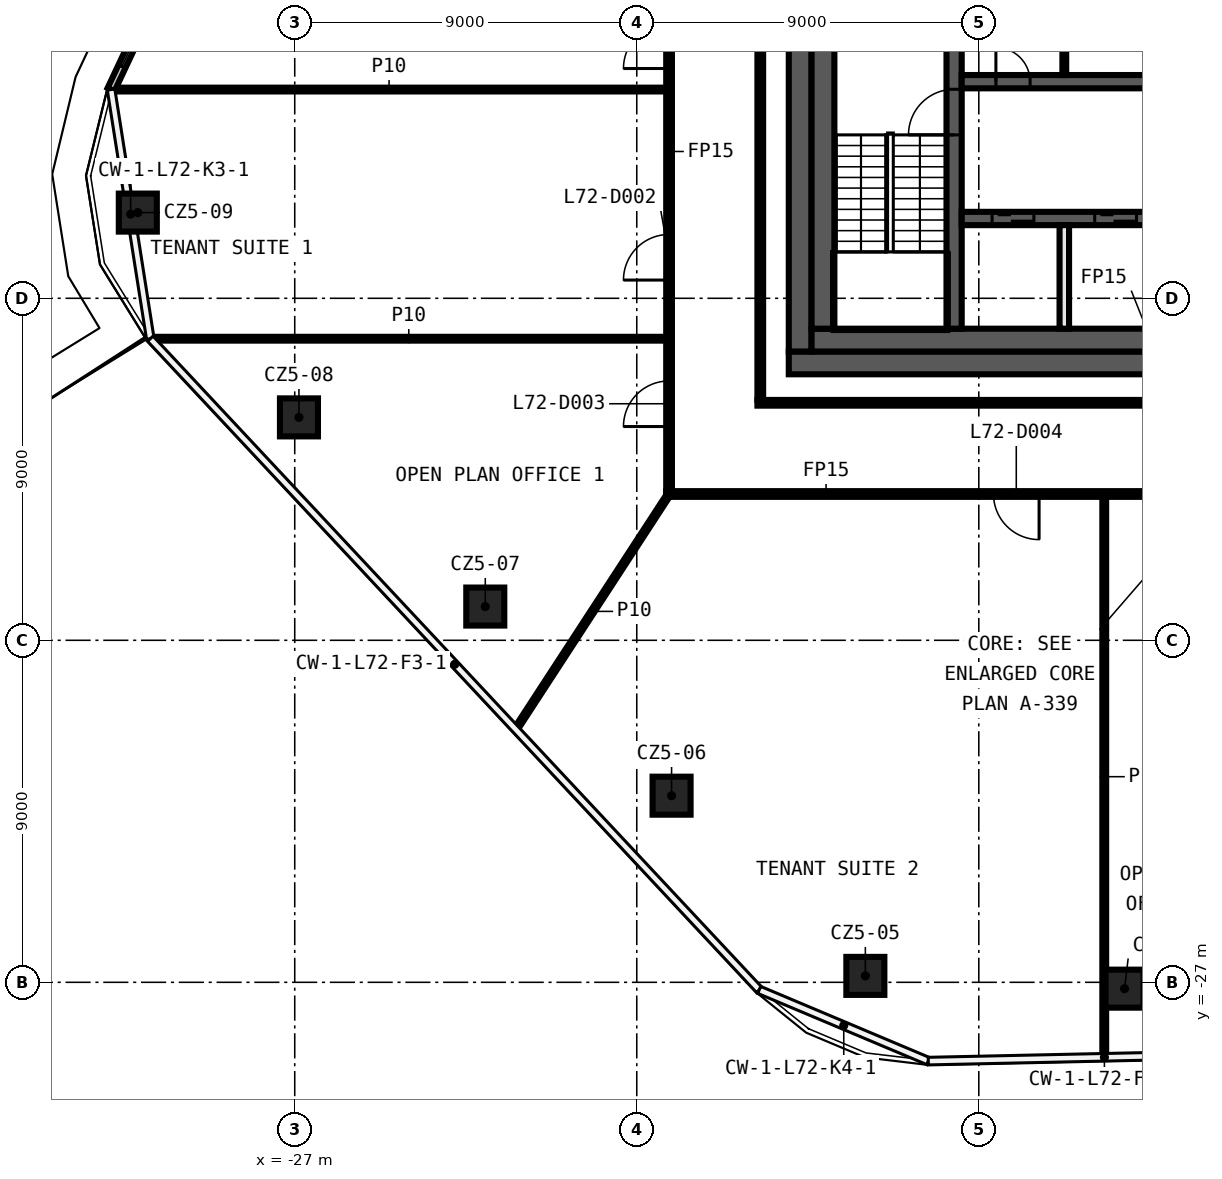
"""IFC4 building model, lengths in metres.
Left out: names, types, materials, properties, quantities, classifications, styles, units other than length and angle.
Written with IfcOpenShell. Run it as: python <this file> out.ifc"""

import sys

from ifc_helpers import new_model, si_unit, direction, frame, frame_2d, origin, origin_2d, place, context, subcontext, project, spatial, rectangle, extrude, element, fill, save


model = new_model("IFC4")
c1 = context("Model", 3, precision=1e-05, world=origin(), true_north=direction((0.0, 1.0)))
c2 = subcontext(c1, "Body", "Model", "MODEL_VIEW")
j1 = project(units=[si_unit("LENGTHUNIT", "METRE"), si_unit("PLANEANGLEUNIT", "RADIAN")], contexts=[c1])
p1 = place(None, origin())
s1 = spatial("IfcSite", under=j1, at=p1, CompositionType="ELEMENT")
p2 = place(p1, origin())
s2 = spatial("IfcBuilding", under=s1, at=p2, CompositionType="ELEMENT")
p3 = place(p2, frame((0.0, 0.0, 336.2)))
s3 = spatial("IfcBuildingStorey", under=s2, at=p3, CompositionType="ELEMENT", Elevation=336.2)
for number, where, z_axis, x_axis in (
    (1, (-5.166, -27.167, 0.0), (0.0, 0.0, 1.0), (1.0, 0.0, 0.0)),
    (2, (-11.985, -26.831, 0.0), (0.0, 0.0, 1.0), (1.0, 0.0, 0.0)),
    (3, (-17.084, -22.089, 0.0), (0.0, 0.0, 1.0), (1.0, 0.0, 0.0)),
    (4, (-21.986, -17.112, 0.0), (0.0, 0.0, 1.0), (1.0, 0.0, 0.0)),
    (5, (-26.889, -12.134, 0.0), (0.0, 0.0, 1.0), (1.0, 0.0, 0.0)),
    (6, (-31.129, -6.745, 0.0), (0.0, 0.0, 1.0), (1.0, 0.0, 0.0)),
):
    element("IfcColumn", number, at=place(p3, frame(where, z_axis=z_axis, x_axis=x_axis)), inside=s3, PredefinedType="COLUMN", context=c2, shape_type="SweptSolid", body=[
        extrude(rectangle(XDim=1.0, YDim=1.0, at=origin_2d()), origin(), (0.0, 0.0, 1.0), 3.82),
    ])
p4 = place(p3, frame((17.225, -14.15, 0.0), z_axis=(0.0, 0.0, 1.0), x_axis=(-1.0, 0.0, 0.0)))
e7 = element("IfcWall", 7, at=p4, inside=s3, PredefinedType="PARTITIONING", context=c2, shape_type="SweptSolid", body=[
    extrude(rectangle(XDim=34.45, YDim=0.15, at=frame_2d((17.225, 0.0))), origin(), (0.0, 0.0, 1.0), 3.82),
])
p5 = place(p4, frame((24.639, 0.0, 0.0)))
e8 = element("IfcOpeningElement", 8, at=p5, cuts=e7, PredefinedType="OPENING", context=c2, shape_type="SweptSolid", body=[
    extrude(rectangle(XDim=1.2, YDim=2.1, at=frame_2d((0.6, 1.05))), frame((0.0, 0.085, 0.0), z_axis=(0.0, -1.0, 0.0), x_axis=(1.0, 0.0, 0.0)), (0.0, 0.0, 1.0), 0.17),
])
p6 = place(p4, frame((20.005, 0.0, 0.0)))
e9 = element("IfcOpeningElement", 9, at=p6, cuts=e7, PredefinedType="OPENING", context=c2, shape_type="SweptSolid", body=[
    extrude(rectangle(XDim=1.2, YDim=2.1, at=frame_2d((0.6, 1.05))), frame((0.0, 0.085, 0.0), z_axis=(0.0, -1.0, 0.0), x_axis=(1.0, 0.0, 0.0)), (0.0, 0.0, 1.0), 0.17),
])
p7 = place(p4, frame((15.367, 0.0, 0.0)))
e10 = element("IfcOpeningElement", 10, at=p7, cuts=e7, PredefinedType="OPENING", context=c2, shape_type="SweptSolid", body=[
    extrude(rectangle(XDim=1.2, YDim=2.1, at=frame_2d((0.6, 1.05))), frame((0.0, 0.085, 0.0), z_axis=(0.0, -1.0, 0.0), x_axis=(1.0, 0.0, 0.0)), (0.0, 0.0, 1.0), 0.17),
])
p8 = place(p4, frame((10.73, 0.0, 0.0)))
e11 = element("IfcOpeningElement", 11, at=p8, cuts=e7, PredefinedType="OPENING", context=c2, shape_type="SweptSolid", body=[
    extrude(rectangle(XDim=1.2, YDim=2.1, at=frame_2d((0.6, 1.05))), frame((0.0, 0.085, 0.0), z_axis=(0.0, -1.0, 0.0), x_axis=(1.0, 0.0, 0.0)), (0.0, 0.0, 1.0), 0.17),
])
p9 = place(p4, frame((6.097, 0.0, 0.0)))
e12 = element("IfcOpeningElement", 12, at=p9, cuts=e7, PredefinedType="OPENING", context=c2, shape_type="SweptSolid", body=[
    extrude(rectangle(XDim=1.2, YDim=2.1, at=frame_2d((0.6, 1.05))), frame((0.0, 0.085, 0.0), z_axis=(0.0, -1.0, 0.0), x_axis=(1.0, 0.0, 0.0)), (0.0, 0.0, 1.0), 0.17),
])
p10 = place(p4, frame((1.83, 0.0, 0.0)))
e13 = element("IfcOpeningElement", 13, at=p10, cuts=e7, PredefinedType="OPENING", context=c2, shape_type="SweptSolid", body=[
    extrude(rectangle(XDim=1.2, YDim=2.1, at=frame_2d((0.6, 1.05))), frame((0.0, 0.085, 0.0), z_axis=(0.0, -1.0, 0.0), x_axis=(1.0, 0.0, 0.0)), (0.0, 0.0, 1.0), 0.17),
])
p11 = place(p3, frame((-14.825, -11.75, 0.0), z_axis=(0.0, 0.0, 1.0), x_axis=(1.0, 0.0, 0.0)))
e14 = element("IfcWall", 14, at=p11, inside=s3, PredefinedType="PARTITIONING", context=c2, shape_type="SweptSolid", body=[
    extrude(rectangle(XDim=22.025, YDim=0.15, at=frame_2d((11.012, 0.0))), origin(), (0.0, 0.0, 1.0), 3.82),
])
p12 = place(p3, frame((-30.773, -10.064, 0.0), z_axis=(0.0, 0.0, 1.0), x_axis=(1.0, 0.0, 0.0)))
e15 = element("IfcWall", 15, at=p12, inside=s3, PredefinedType="PARTITIONING", context=c2, shape_type="SweptSolid", body=[
    extrude(rectangle(XDim=13.548, YDim=0.1, at=frame_2d((6.774, 0.0))), origin(), (0.0, 0.0, 1.0), 3.82),
])
p13 = place(p3, frame((-31.811, -3.507, 0.0), z_axis=(0.0, 0.0, 1.0), x_axis=(1.0, 0.0, 0.0)))
e16 = element("IfcWall", 16, at=p13, inside=s3, PredefinedType="PARTITIONING", context=c2, shape_type="SweptSolid", body=[
    extrude(rectangle(XDim=14.586, YDim=0.1, at=frame_2d((7.293, 0.0))), origin(), (0.0, 0.0, 1.0), 3.82),
])
p14 = place(p3, frame((-21.176, -20.328, 0.0), z_axis=(0.0, 0.0, 1.0), x_axis=(0.5459597113, 0.837811430834, 0.0)))
e17 = element("IfcWall", 17, at=p14, inside=s3, PredefinedType="PARTITIONING", context=c2, shape_type="SweptSolid", body=[
    extrude(rectangle(XDim=7.374, YDim=0.1, at=frame_2d((3.687, 0.0))), origin(), (0.0, 0.0, 1.0), 3.82),
])
p15 = place(p3, frame((-5.699, -28.953, 0.0), z_axis=(0.0, 0.0, 1.0), x_axis=(0.0, 1.0, 0.0)))
e18 = element("IfcWall", 18, at=p15, inside=s3, PredefinedType="PARTITIONING", context=c2, shape_type="SweptSolid", body=[
    extrude(rectangle(XDim=14.728, YDim=0.1, at=frame_2d((7.364, 0.0))), origin(), (0.0, 0.0, 1.0), 3.82),
])
p16 = place(p3, frame((-14.75, -11.675, 0.0), z_axis=(0.0, 0.0, 1.0), x_axis=(0.0, 1.0, 0.0)))
e19 = element("IfcWall", 19, at=p16, inside=s3, PredefinedType="PARTITIONING", context=c2, shape_type="SweptSolid", body=[
    extrude(rectangle(XDim=23.35, YDim=0.15, at=frame_2d((11.675, 0.0))), origin(), (0.0, 0.0, 1.0), 3.82),
])
p17 = place(p3, frame((-17.15, -14.075, 0.0), z_axis=(0.0, 0.0, 1.0), x_axis=(0.0, 1.0, 0.0)))
e20 = element("IfcWall", 20, at=p17, inside=s3, PredefinedType="PARTITIONING", context=c2, shape_type="SweptSolid", body=[
    extrude(rectangle(XDim=28.15, YDim=0.15, at=frame_2d((14.075, 0.0))), origin(), (0.0, 0.0, 1.0), 3.82),
])
p18 = place(p17, frame((11.122, 0.0, 0.0)))
e21 = element("IfcOpeningElement", 21, at=p18, cuts=e20, PredefinedType="OPENING", context=c2, shape_type="SweptSolid", body=[
    extrude(rectangle(XDim=1.2, YDim=2.1, at=frame_2d((0.6, 1.05))), frame((0.0, 0.085, 0.0), z_axis=(0.0, -1.0, 0.0), x_axis=(1.0, 0.0, 0.0)), (0.0, 0.0, 1.0), 0.17),
])
p19 = place(p17, frame((5.555, 0.0, 0.0)))
e22 = element("IfcOpeningElement", 22, at=p19, cuts=e20, PredefinedType="OPENING", context=c2, shape_type="SweptSolid", body=[
    extrude(rectangle(XDim=1.2, YDim=2.1, at=frame_2d((0.6, 1.05))), frame((0.0, 0.085, 0.0), z_axis=(0.0, -1.0, 0.0), x_axis=(1.0, 0.0, 0.0)), (0.0, 0.0, 1.0), 0.17),
])
p20 = place(p17, frame((1.7, 0.0, 0.0)))
e23 = element("IfcOpeningElement", 23, at=p20, cuts=e20, PredefinedType="OPENING", context=c2, shape_type="SweptSolid", body=[
    extrude(rectangle(XDim=1.2, YDim=2.1, at=frame_2d((0.6, 1.05))), frame((0.0, 0.085, 0.0), z_axis=(0.0, -1.0, 0.0), x_axis=(1.0, 0.0, 0.0)), (0.0, 0.0, 1.0), 0.17),
])
p21 = place(p17, frame((24.457, 0.0, 0.0)))
e24 = element("IfcOpeningElement", 24, at=p21, cuts=e20, PredefinedType="OPENING", context=c2, shape_type="SweptSolid", body=[
    extrude(rectangle(XDim=1.2, YDim=2.1, at=frame_2d((0.6, 1.05))), frame((0.0, 0.085, 0.0), z_axis=(0.0, -1.0, 0.0), x_axis=(1.0, 0.0, 0.0)), (0.0, 0.0, 1.0), 0.17),
])
p22 = place(p17, frame((20.314, 0.0, 0.0)))
e25 = element("IfcOpeningElement", 25, at=p22, cuts=e20, PredefinedType="OPENING", context=c2, shape_type="SweptSolid", body=[
    extrude(rectangle(XDim=1.2, YDim=2.1, at=frame_2d((0.6, 1.05))), frame((0.0, 0.085, 0.0), z_axis=(0.0, -1.0, 0.0), x_axis=(1.0, 0.0, 0.0)), (0.0, 0.0, 1.0), 0.17),
])
p23 = place(p17, frame((16.172, 0.0, 0.0)))
e26 = element("IfcOpeningElement", 26, at=p23, cuts=e20, PredefinedType="OPENING", context=c2, shape_type="SweptSolid", body=[
    extrude(rectangle(XDim=1.2, YDim=2.1, at=frame_2d((0.6, 1.05))), frame((0.0, 0.085, 0.0), z_axis=(0.0, -1.0, 0.0), x_axis=(1.0, 0.0, 0.0)), (0.0, 0.0, 1.0), 0.17),
])
p24 = place(p3, frame((-29.889, 0.626, 0.0), z_axis=(0.0, 0.0, 1.0), x_axis=(-0.425531877643, -0.904943435309, 0.0)))
e27 = element("IfcWall", 27, at=p24, inside=s3, PredefinedType="SOLIDWALL", context=c2, shape_type="SweptSolid", body=[
    extrude(rectangle(XDim=4.567, YDim=0.2, at=frame_2d((2.284, 0.0))), origin(), (0.0, 0.0, 1.0), 3.82),
])
p25 = place(p24, frame((2.3, 0.0, 0.6)))
e28 = element("IfcOpeningElement", 28, at=p25, cuts=e27, PredefinedType="OPENING", context=c2, shape_type="SweptSolid", body=[
    extrude(rectangle(XDim=1.6, YDim=2.4, at=frame_2d((0.8, 1.2))), frame((0.0, 0.11, 0.0), z_axis=(0.0, -1.0, 0.0), x_axis=(1.0, 0.0, 0.0)), (0.0, 0.0, 1.0), 0.22),
])
p26 = place(p24, frame((0.8, 0.0, 0.0)))
e29 = element("IfcOpeningElement", 29, at=p26, cuts=e27, PredefinedType="OPENING", context=c2, shape_type="SweptSolid", body=[
    extrude(rectangle(XDim=1.2, YDim=2.4, at=frame_2d((0.6, 1.2))), frame((0.0, 0.11, 0.0), z_axis=(0.0, -1.0, 0.0), x_axis=(1.0, 0.0, 0.0)), (0.0, 0.0, 1.0), 0.22),
])
p27 = place(p3, frame((14.0, -10.7, 0.0), z_axis=(0.0, 0.0, 1.0), x_axis=(-1.0, 0.0, 0.0)))
e30 = element("IfcWall", 30, at=p27, inside=s3, PredefinedType="SHEAR", context=c2, shape_type="SweptSolid", body=[
    extrude(rectangle(XDim=28.0, YDim=0.6, at=frame_2d((14.0, 0.0))), origin(), (0.0, 0.0, 1.0), 3.82),
])
p28 = place(p27, frame((5.1, 0.0, 0.0)))
e31 = element("IfcOpeningElement", 31, at=p28, cuts=e30, PredefinedType="OPENING", context=c2, shape_type="SweptSolid", body=[
    extrude(rectangle(XDim=1.6, YDim=2.1, at=frame_2d((0.8, 1.05))), frame((0.0, 0.31, 0.0), z_axis=(0.0, -1.0, 0.0), x_axis=(1.0, 0.0, 0.0)), (0.0, 0.0, 1.0), 0.62),
])
p29 = place(p3, frame((-13.7, -10.4, 0.0), z_axis=(0.0, 0.0, 1.0), x_axis=(0.0, 1.0, 0.0)))
e32 = element("IfcWall", 32, at=p29, inside=s3, PredefinedType="SHEAR", context=c2, shape_type="SweptSolid", body=[
    extrude(rectangle(XDim=20.8, YDim=0.6, at=frame_2d((10.4, 0.0))), origin(), (0.0, 0.0, 1.0), 3.82),
])
p30 = place(p3, frame((6.9, -10.1, 0.0), z_axis=(0.0, 0.0, 1.0), x_axis=(-1.0, 0.0, 0.0)))
e33 = element("IfcWall", 33, at=p30, inside=s3, PredefinedType="SHEAR", context=c2, shape_type="SweptSolid", body=[
    extrude(rectangle(XDim=20.3, YDim=0.6, at=frame_2d((10.15, 0.0))), origin(), (0.0, 0.0, 1.0), 3.82),
])
p31 = place(p3, frame((-13.1, -9.8, 0.0), z_axis=(0.0, 0.0, 1.0), x_axis=(0.0, 1.0, 0.0)))
e34 = element("IfcWall", 34, at=p31, inside=s3, PredefinedType="SHEAR", context=c2, shape_type="SweptSolid", body=[
    extrude(rectangle(XDim=19.6, YDim=0.6, at=frame_2d((9.8, 0.0))), origin(), (0.0, 0.0, 1.0), 3.82),
])
p32 = place(p3, frame((-9.65, -9.8, 0.0), z_axis=(0.0, 0.0, 1.0), x_axis=(0.0, 1.0, 0.0)))
e35 = element("IfcWall", 35, at=p32, inside=s3, PredefinedType="SHEAR", context=c2, shape_type="SweptSolid", body=[
    extrude(rectangle(XDim=7.5, YDim=0.4, at=frame_2d((3.75, 0.0))), origin(), (0.0, 0.0, 1.0), 3.82),
])
p33 = place(p32, frame((5.1, 0.0, 0.0)))
e36 = element("IfcOpeningElement", 36, at=p33, cuts=e35, PredefinedType="OPENING", context=c2, shape_type="SweptSolid", body=[
    extrude(rectangle(XDim=1.2, YDim=2.1, at=frame_2d((0.6, 1.05))), frame((0.0, 0.21, 0.0), z_axis=(0.0, -1.0, 0.0), x_axis=(1.0, 0.0, 0.0)), (0.0, 0.0, 1.0), 0.42),
])
p34 = place(p3, frame((-9.45, -3.3, 0.0), z_axis=(0.0, 0.0, 1.0), x_axis=(1.0, 0.0, 0.0)))
e37 = element("IfcWall", 37, at=p34, inside=s3, PredefinedType="SHEAR", context=c2, shape_type="SweptSolid", body=[
    extrude(rectangle(XDim=18.9, YDim=0.35, at=frame_2d((9.45, 0.0))), origin(), (0.0, 0.0, 1.0), 3.82),
])
p35 = place(p34, frame((17.0, 0.0, 0.0)))
e38 = element("IfcOpeningElement", 38, at=p35, cuts=e37, PredefinedType="OPENING", context=c2, shape_type="SweptSolid", body=[
    extrude(rectangle(XDim=1.1, YDim=2.1, at=frame_2d((0.55, 1.05))), frame((0.0, 0.185, 0.0), z_axis=(0.0, -1.0, 0.0), x_axis=(1.0, 0.0, 0.0)), (0.0, 0.0, 1.0), 0.37),
])
p36 = place(p34, frame((0.9, 0.0, 0.0)))
e39 = element("IfcOpeningElement", 39, at=p36, cuts=e37, PredefinedType="OPENING", context=c2, shape_type="SweptSolid", body=[
    extrude(rectangle(XDim=0.9, YDim=2.1, at=frame_2d((0.45, 1.05))), frame((0.0, 0.185, 0.0), z_axis=(0.0, -1.0, 0.0), x_axis=(1.0, 0.0, 0.0)), (0.0, 0.0, 1.0), 0.37),
])
p37 = place(p34, frame((4.95, 0.0, 0.0)))
e40 = element("IfcOpeningElement", 40, at=p37, cuts=e37, PredefinedType="OPENING", context=c2, shape_type="SweptSolid", body=[
    extrude(rectangle(XDim=0.9, YDim=2.1, at=frame_2d((0.45, 1.05))), frame((0.0, 0.185, 0.0), z_axis=(0.0, -1.0, 0.0), x_axis=(1.0, 0.0, 0.0)), (0.0, 0.0, 1.0), 0.37),
])
p38 = place(p34, frame((9.0, 0.0, 0.0)))
e41 = element("IfcOpeningElement", 41, at=p38, cuts=e37, PredefinedType="OPENING", context=c2, shape_type="SweptSolid", body=[
    extrude(rectangle(XDim=0.9, YDim=2.1, at=frame_2d((0.45, 1.05))), frame((0.0, 0.185, 0.0), z_axis=(0.0, -1.0, 0.0), x_axis=(1.0, 0.0, 0.0)), (0.0, 0.0, 1.0), 0.37),
])
p39 = place(p34, frame((13.05, 0.0, 0.0)))
e42 = element("IfcOpeningElement", 42, at=p39, cuts=e37, PredefinedType="OPENING", context=c2, shape_type="SweptSolid", body=[
    extrude(rectangle(XDim=0.9, YDim=2.1, at=frame_2d((0.45, 1.05))), frame((0.0, 0.185, 0.0), z_axis=(0.0, -1.0, 0.0), x_axis=(1.0, 0.0, 0.0)), (0.0, 0.0, 1.0), 0.37),
])
p40 = place(p3, frame((9.45, -6.9, 0.0), z_axis=(0.0, 0.0, 1.0), x_axis=(-1.0, 0.0, 0.0)))
e43 = element("IfcWall", 43, at=p40, inside=s3, PredefinedType="SHEAR", context=c2, shape_type="SweptSolid", body=[
    extrude(rectangle(XDim=18.9, YDim=0.35, at=frame_2d((9.45, 0.0))), origin(), (0.0, 0.0, 1.0), 3.82),
])
p41 = place(p40, frame((17.0, 0.0, 0.0)))
e44 = element("IfcOpeningElement", 44, at=p41, cuts=e43, PredefinedType="OPENING", context=c2, shape_type="SweptSolid", body=[
    extrude(rectangle(XDim=1.1, YDim=2.1, at=frame_2d((0.55, 1.05))), frame((0.0, 0.185, 0.0), z_axis=(0.0, -1.0, 0.0), x_axis=(1.0, 0.0, 0.0)), (0.0, 0.0, 1.0), 0.37),
])
p42 = place(p40, frame((14.3, 0.0, 0.0)))
e45 = element("IfcOpeningElement", 45, at=p42, cuts=e43, PredefinedType="OPENING", context=c2, shape_type="SweptSolid", body=[
    extrude(rectangle(XDim=1.1, YDim=2.1, at=frame_2d((0.55, 1.05))), frame((0.0, 0.185, 0.0), z_axis=(0.0, -1.0, 0.0), x_axis=(1.0, 0.0, 0.0)), (0.0, 0.0, 1.0), 0.37),
])
p43 = place(p40, frame((11.6, 0.0, 0.0)))
e46 = element("IfcOpeningElement", 46, at=p43, cuts=e43, PredefinedType="OPENING", context=c2, shape_type="SweptSolid", body=[
    extrude(rectangle(XDim=1.1, YDim=2.1, at=frame_2d((0.55, 1.05))), frame((0.0, 0.185, 0.0), z_axis=(0.0, -1.0, 0.0), x_axis=(1.0, 0.0, 0.0)), (0.0, 0.0, 1.0), 0.37),
])
p44 = place(p40, frame((8.9, 0.0, 0.0)))
e47 = element("IfcOpeningElement", 47, at=p44, cuts=e43, PredefinedType="OPENING", context=c2, shape_type="SweptSolid", body=[
    extrude(rectangle(XDim=1.1, YDim=2.1, at=frame_2d((0.55, 1.05))), frame((0.0, 0.185, 0.0), z_axis=(0.0, -1.0, 0.0), x_axis=(1.0, 0.0, 0.0)), (0.0, 0.0, 1.0), 0.37),
])
p45 = place(p40, frame((0.75, 0.0, 0.0)))
e48 = element("IfcOpeningElement", 48, at=p45, cuts=e43, PredefinedType="OPENING", context=c2, shape_type="SweptSolid", body=[
    extrude(rectangle(XDim=1.2, YDim=2.1, at=frame_2d((0.6, 1.05))), frame((0.0, 0.185, 0.0), z_axis=(0.0, -1.0, 0.0), x_axis=(1.0, 0.0, 0.0)), (0.0, 0.0, 1.0), 0.37),
])
p46 = place(p40, frame((6.3, 0.0, 0.0)))
e49 = element("IfcOpeningElement", 49, at=p46, cuts=e43, PredefinedType="OPENING", context=c2, shape_type="SweptSolid", body=[
    extrude(rectangle(XDim=0.9, YDim=2.1, at=frame_2d((0.45, 1.05))), frame((0.0, 0.185, 0.0), z_axis=(0.0, -1.0, 0.0), x_axis=(1.0, 0.0, 0.0)), (0.0, 0.0, 1.0), 0.37),
])
p47 = place(p40, frame((3.6, 0.0, 0.0)))
e50 = element("IfcOpeningElement", 50, at=p47, cuts=e43, PredefinedType="OPENING", context=c2, shape_type="SweptSolid", body=[
    extrude(rectangle(XDim=0.9, YDim=2.1, at=frame_2d((0.45, 1.05))), frame((0.0, 0.185, 0.0), z_axis=(0.0, -1.0, 0.0), x_axis=(1.0, 0.0, 0.0)), (0.0, 0.0, 1.0), 0.37),
])
p48 = place(p3, frame((-6.75, -3.125, 0.0), z_axis=(0.0, 0.0, 1.0), x_axis=(0.0, 1.0, 0.0)))
e51 = element("IfcWall", 51, at=p48, inside=s3, PredefinedType="PARTITIONING", context=c2, shape_type="SweptSolid", body=[
    extrude(rectangle(XDim=2.725, YDim=0.1, at=frame_2d((1.363, 0.0))), origin(), (0.0, 0.0, 1.0), 3.82),
])
p49 = place(p3, frame((-6.75, -9.8, 0.0), z_axis=(0.0, 0.0, 1.0), x_axis=(0.0, 1.0, 0.0)))
e52 = element("IfcWall", 52, at=p49, inside=s3, PredefinedType="SOLIDWALL", context=c2, shape_type="SweptSolid", body=[
    extrude(rectangle(XDim=2.725, YDim=0.25, at=frame_2d((1.363, 0.0))), origin(), (0.0, 0.0, 1.0), 3.82),
])
p50 = place(p18, origin())
e53 = element("IfcDoor", 53, at=p50, inside=s3, OperationType="SINGLE_SWING_RIGHT", PredefinedType="DOOR", context=c2, shape_type="SweptSolid", body=[
    extrude(rectangle(XDim=1.2, YDim=2.1, at=frame_2d((0.6, 1.05))), frame((0.0, 0.025, 0.0), z_axis=(0.0, -1.0, 0.0), x_axis=(1.0, 0.0, 0.0)), (0.0, 0.0, 1.0), 0.05),
])
fill(e21, e53)
p51 = place(p19, origin())
e54 = element("IfcDoor", 54, at=p51, inside=s3, OperationType="SINGLE_SWING_LEFT", PredefinedType="DOOR", context=c2, shape_type="SweptSolid", body=[
    extrude(rectangle(XDim=1.2, YDim=2.1, at=frame_2d((0.6, 1.05))), frame((0.0, 0.025, 0.0), z_axis=(0.0, -1.0, 0.0), x_axis=(1.0, 0.0, 0.0)), (0.0, 0.0, 1.0), 0.05),
])
fill(e22, e54)
p52 = place(p20, origin())
e55 = element("IfcDoor", 55, at=p52, inside=s3, OperationType="SINGLE_SWING_RIGHT", PredefinedType="DOOR", context=c2, shape_type="SweptSolid", body=[
    extrude(rectangle(XDim=1.2, YDim=2.1, at=frame_2d((0.6, 1.05))), frame((0.0, 0.025, 0.0), z_axis=(0.0, -1.0, 0.0), x_axis=(1.0, 0.0, 0.0)), (0.0, 0.0, 1.0), 0.05),
])
fill(e23, e55)
p53 = place(p5, origin())
e56 = element("IfcDoor", 56, at=p53, inside=s3, OperationType="SINGLE_SWING_LEFT", PredefinedType="DOOR", context=c2, shape_type="SweptSolid", body=[
    extrude(rectangle(XDim=1.2, YDim=2.1, at=frame_2d((0.6, 1.05))), frame((0.0, 0.025, 0.0), z_axis=(0.0, -1.0, 0.0), x_axis=(1.0, 0.0, 0.0)), (0.0, 0.0, 1.0), 0.05),
])
fill(e8, e56)
p54 = place(p25, origin())
e57 = element("IfcWindow", 57, at=p54, inside=s3, PartitioningType="SINGLE_PANEL", PredefinedType="WINDOW", context=c2, shape_type="SweptSolid", body=[
    extrude(rectangle(XDim=1.6, YDim=2.4, at=frame_2d((0.8, 1.2))), frame((0.0, 0.03, 0.0), z_axis=(0.0, -1.0, 0.0), x_axis=(1.0, 0.0, 0.0)), (0.0, 0.0, 1.0), 0.06),
])
fill(e28, e57)
p55 = place(p41, origin())
e58 = element("IfcDoor", 58, at=p55, inside=s3, OperationType="DOUBLE_DOOR_SLIDING", PredefinedType="DOOR", context=c2, shape_type="SweptSolid", body=[
    extrude(rectangle(XDim=1.1, YDim=2.1, at=frame_2d((0.55, 1.05))), frame((0.0, 0.025, 0.0), z_axis=(0.0, -1.0, 0.0), x_axis=(1.0, 0.0, 0.0)), (0.0, 0.0, 1.0), 0.05),
])
fill(e44, e58)
p56 = place(p42, origin())
e59 = element("IfcDoor", 59, at=p56, inside=s3, OperationType="DOUBLE_DOOR_SLIDING", PredefinedType="DOOR", context=c2, shape_type="SweptSolid", body=[
    extrude(rectangle(XDim=1.1, YDim=2.1, at=frame_2d((0.55, 1.05))), frame((0.0, 0.025, 0.0), z_axis=(0.0, -1.0, 0.0), x_axis=(1.0, 0.0, 0.0)), (0.0, 0.0, 1.0), 0.05),
])
fill(e45, e59)
p57 = place(p36, origin())
e60 = element("IfcDoor", 60, at=p57, inside=s3, OperationType="SINGLE_SWING_RIGHT", PredefinedType="DOOR", context=c2, shape_type="SweptSolid", body=[
    extrude(rectangle(XDim=0.9, YDim=2.1, at=frame_2d((0.45, 1.05))), frame((0.0, 0.025, 0.0), z_axis=(0.0, -1.0, 0.0), x_axis=(1.0, 0.0, 0.0)), (0.0, 0.0, 1.0), 0.05),
])
fill(e39, e60)
p58 = place(p33, origin())
e61 = element("IfcDoor", 61, at=p58, inside=s3, OperationType="SINGLE_SWING_LEFT", PredefinedType="DOOR", context=c2, shape_type="SweptSolid", body=[
    extrude(rectangle(XDim=1.2, YDim=2.1, at=frame_2d((0.6, 1.05))), frame((0.0, 0.025, 0.0), z_axis=(0.0, -1.0, 0.0), x_axis=(1.0, 0.0, 0.0)), (0.0, 0.0, 1.0), 0.05),
])
fill(e36, e61)
save(model, sys.argv[1])
